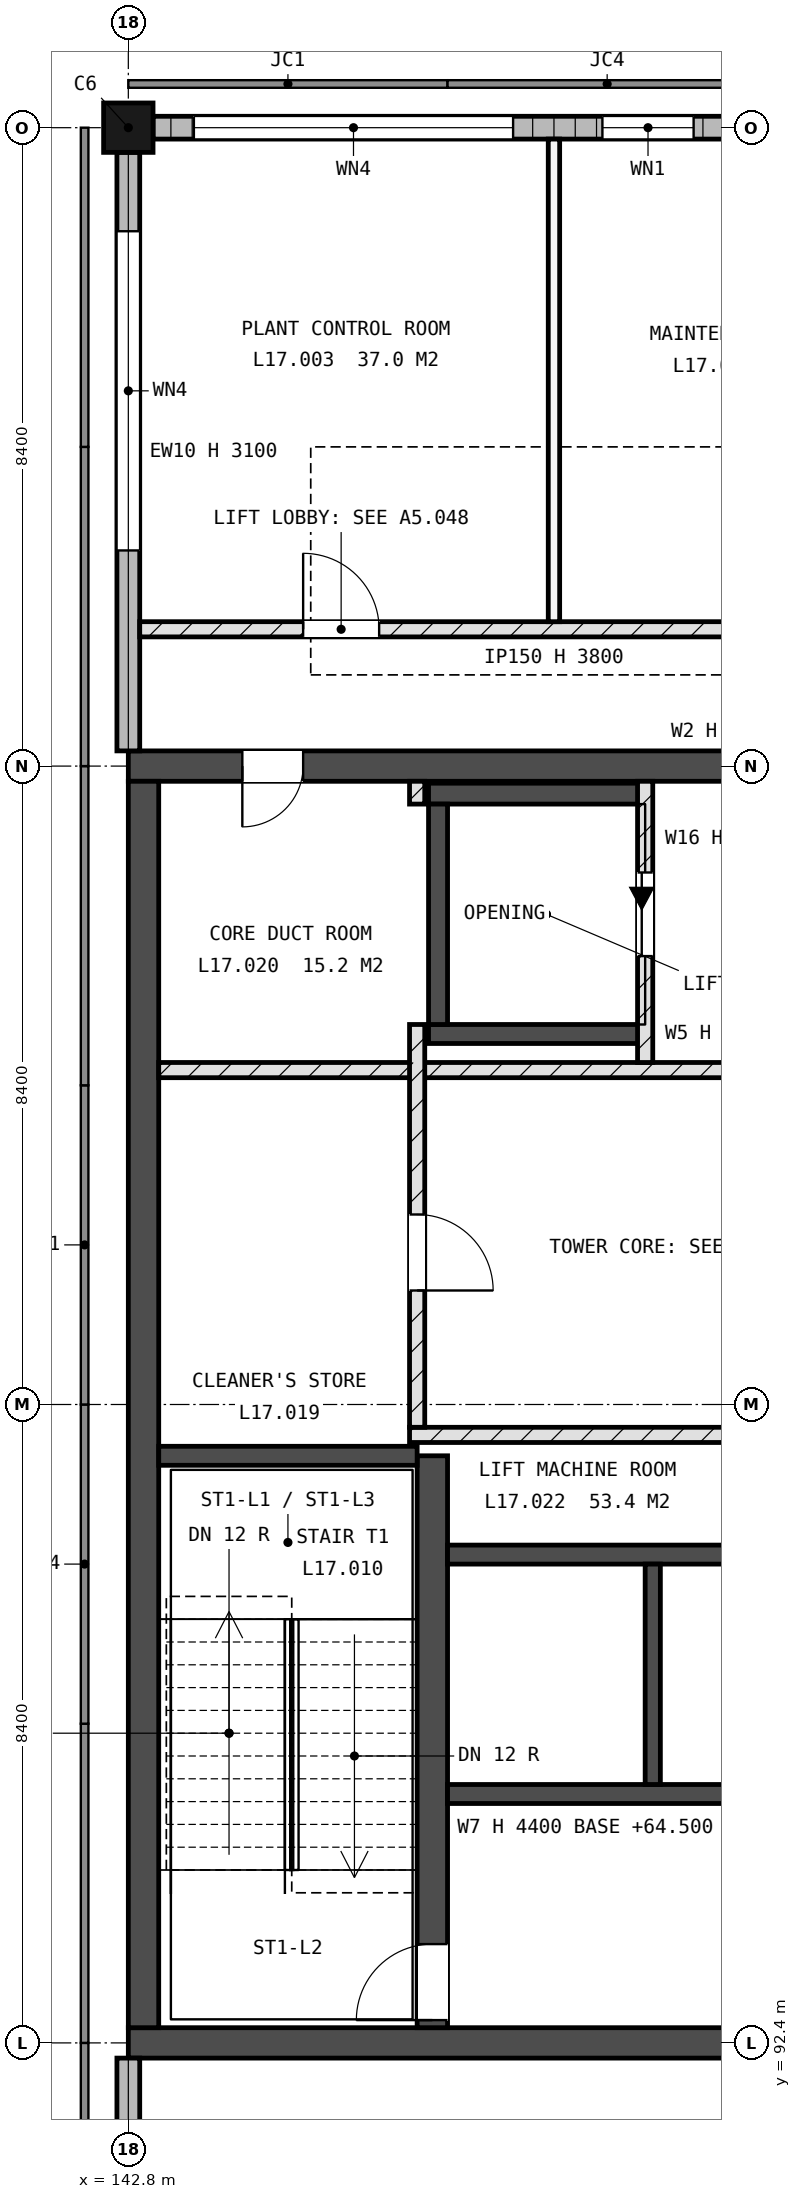
"""IFC4 building model, lengths in metres.
Left out: names, types, materials, properties, quantities, classifications, styles, units other than length and angle.
Written with IfcOpenShell. Run it as: python <this file> out.ifc"""

import sys

from ifc_helpers import new_model, si_unit, direction, frame, frame_2d, origin, origin_2d, place, context, subcontext, project, spatial, rectangle, extrude, element, fill, save


model = new_model("IFC4")
c1 = context("Model", 3, precision=1e-05, world=origin(), true_north=direction((0.0, 1.0)))
c2 = subcontext(c1, "Body", "Model", "MODEL_VIEW")
j1 = project(units=[si_unit("LENGTHUNIT", "METRE"), si_unit("PLANEANGLEUNIT", "RADIAN")], contexts=[c1])
p1 = place(None, origin())
s1 = spatial("IfcSite", under=j1, at=p1, CompositionType="ELEMENT")
p2 = place(p1, origin())
s2 = spatial("IfcBuilding", under=s1, at=p2, CompositionType="ELEMENT")
p3 = place(p2, frame((0.0, 0.0, 64.8)))
s3 = spatial("IfcBuildingStorey", under=s2, at=p3, CompositionType="ELEMENT", Elevation=64.8)
p4 = place(p3, frame((142.8, 117.6, -0.3), z_axis=(0.0, 0.0, 1.0), x_axis=(1.0, 0.0, 0.0)))
e1 = element("IfcColumn", 1, at=p4, inside=s3, PredefinedType="COLUMN", context=c2, shape_type="SweptSolid", body=[
    extrude(rectangle(XDim=0.65, YDim=0.65, at=origin_2d()), origin(), (0.0, 0.0, 1.0), 4.4),
])
p5 = place(p3, frame((142.8, 92.4, -0.3), z_axis=(0.0, 0.0, 1.0), x_axis=(1.0, 0.0, 0.0)))
e2 = element("IfcWall", 2, at=p5, inside=s3, PredefinedType="SHEAR", context=c2, shape_type="SweptSolid", body=[
    extrude(rectangle(XDim=25.2, YDim=0.4, at=frame_2d((12.6, 0.0))), origin(), (0.0, 0.0, 1.0), 4.4),
])
p6 = place(p5, frame((19.0, 0.0, 0.3)))
e3 = element("IfcOpeningElement", 3, at=p6, cuts=e2, PredefinedType="OPENING", context=c2, shape_type="SweptSolid", body=[
    extrude(rectangle(XDim=1.2, YDim=2.4, at=frame_2d((0.6, 1.2))), frame((0.0, 0.21, 0.0), z_axis=(0.0, -1.0, 0.0), x_axis=(1.0, 0.0, 0.0)), (0.0, 0.0, 1.0), 0.42),
])
p7 = place(p3, frame((142.8, 109.2, -0.3), z_axis=(0.0, 0.0, 1.0), x_axis=(1.0, 0.0, 0.0)))
e4 = element("IfcWall", 4, at=p7, inside=s3, PredefinedType="SHEAR", context=c2, shape_type="SweptSolid", body=[
    extrude(rectangle(XDim=25.2, YDim=0.4, at=frame_2d((12.6, 0.0))), origin(), (0.0, 0.0, 1.0), 4.4),
])
p8 = place(p7, frame((22.8, 0.0, 0.3)))
e5 = element("IfcOpeningElement", 5, at=p8, cuts=e4, PredefinedType="OPENING", context=c2, shape_type="SweptSolid", body=[
    extrude(rectangle(XDim=1.0, YDim=2.1, at=frame_2d((0.5, 1.05))), frame((0.0, 0.21, 0.0), z_axis=(0.0, -1.0, 0.0), x_axis=(1.0, 0.0, 0.0)), (0.0, 0.0, 1.0), 0.42),
])
p9 = place(p7, frame((1.5, 0.0, 0.3)))
e6 = element("IfcOpeningElement", 6, at=p9, cuts=e4, PredefinedType="OPENING", context=c2, shape_type="SweptSolid", body=[
    extrude(rectangle(XDim=0.8, YDim=2.1, at=frame_2d((0.4, 1.05))), frame((0.0, 0.21, 0.0), z_axis=(0.0, -1.0, 0.0), x_axis=(1.0, 0.0, 0.0)), (0.0, 0.0, 1.0), 0.42),
])
p10 = place(p7, frame((13.4, 0.0, 0.3)))
e7 = element("IfcOpeningElement", 7, at=p10, cuts=e4, PredefinedType="OPENING", context=c2, shape_type="SweptSolid", body=[
    extrude(rectangle(XDim=1.0, YDim=2.1, at=frame_2d((0.5, 1.05))), frame((0.0, 0.21, 0.0), z_axis=(0.0, -1.0, 0.0), x_axis=(1.0, 0.0, 0.0)), (0.0, 0.0, 1.0), 0.42),
])
p11 = place(p3, frame((143.0, 92.6, -0.3), z_axis=(0.0, 0.0, 1.0), x_axis=(0.0, 1.0, 0.0)))
e8 = element("IfcWall", 8, at=p11, inside=s3, PredefinedType="SHEAR", context=c2, shape_type="SweptSolid", body=[
    extrude(rectangle(XDim=16.4, YDim=0.4, at=frame_2d((8.2, 0.0))), origin(), (0.0, 0.0, 1.0), 4.4),
])
p12 = place(p3, frame((146.8, 92.6, -0.3), z_axis=(0.0, 0.0, 1.0), x_axis=(0.0, 1.0, 0.0)))
e9 = element("IfcWall", 9, at=p12, inside=s3, PredefinedType="SHEAR", context=c2, shape_type="SweptSolid", body=[
    extrude(rectangle(XDim=7.525, YDim=0.4, at=frame_2d((3.762, 0.0))), origin(), (0.0, 0.0, 1.0), 4.4),
])
p13 = place(p12, frame((0.1, 0.0, 0.3)))
e10 = element("IfcOpeningElement", 10, at=p13, cuts=e9, PredefinedType="OPENING", context=c2, shape_type="SweptSolid", body=[
    extrude(rectangle(XDim=1.0, YDim=2.1, at=frame_2d((0.5, 1.05))), frame((0.0, 0.21, 0.0), z_axis=(0.0, -1.0, 0.0), x_axis=(1.0, 0.0, 0.0)), (0.0, 0.0, 1.0), 0.42),
])
p14 = place(p3, frame((143.2, 100.125, -0.3), z_axis=(0.0, 0.0, 1.0), x_axis=(1.0, 0.0, 0.0)))
e11 = element("IfcWall", 11, at=p14, inside=s3, PredefinedType="SHEAR", context=c2, shape_type="SweptSolid", body=[
    extrude(rectangle(XDim=3.4, YDim=0.25, at=frame_2d((1.7, 0.0))), origin(), (0.0, 0.0, 1.0), 4.4),
])
for number, where, z_axis, x_axis in (
    (12, (147.0, 95.675, -0.3), (0.0, 0.0, 1.0), (1.0, 0.0, 0.0)),
    (13, (147.0, 98.825, -0.3), (0.0, 0.0, 1.0), (1.0, 0.0, 0.0)),
):
    element("IfcWall", number, at=place(p3, frame(where, z_axis=z_axis, x_axis=x_axis)), inside=s3, PredefinedType="SHEAR", context=c2, shape_type="SweptSolid", body=[
        extrude(rectangle(XDim=11.25, YDim=0.25, at=frame_2d((5.625, 0.0))), origin(), (0.0, 0.0, 1.0), 4.4),
    ])
p15 = place(p3, frame((149.7, 95.8, -0.3), z_axis=(0.0, 0.0, 1.0), x_axis=(0.0, 1.0, 0.0)))
e14 = element("IfcWall", 14, at=p15, inside=s3, PredefinedType="SHEAR", context=c2, shape_type="SweptSolid", body=[
    extrude(rectangle(XDim=2.9, YDim=0.2, at=frame_2d((1.45, 0.0))), origin(), (0.0, 0.0, 1.0), 4.4),
])
p16 = place(p3, frame((146.75, 105.675, -0.3), z_axis=(0.0, 0.0, 1.0), x_axis=(1.0, 0.0, 0.0)))
e15 = element("IfcWall", 15, at=p16, inside=s3, PredefinedType="SHEAR", context=c2, shape_type="SweptSolid", body=[
    extrude(rectangle(XDim=2.85, YDim=0.25, at=frame_2d((1.425, 0.0))), origin(), (0.0, 0.0, 1.0), 4.4),
])
p17 = place(p3, frame((146.75, 108.837, -0.3), z_axis=(0.0, 0.0, 1.0), x_axis=(1.0, 0.0, 0.0)))
e16 = element("IfcWall", 16, at=p17, inside=s3, PredefinedType="SHEAR", context=c2, shape_type="SweptSolid", body=[
    extrude(rectangle(XDim=2.85, YDim=0.275, at=frame_2d((1.425, 0.0))), origin(), (0.0, 0.0, 1.0), 4.4),
])
p18 = place(p3, frame((146.875, 105.8, -0.3), z_axis=(0.0, 0.0, 1.0), x_axis=(0.0, 1.0, 0.0)))
e17 = element("IfcWall", 17, at=p18, inside=s3, PredefinedType="SHEAR", context=c2, shape_type="SweptSolid", body=[
    extrude(rectangle(XDim=2.9, YDim=0.25, at=frame_2d((1.45, 0.0))), origin(), (0.0, 0.0, 1.0), 4.4),
])
p19 = place(p3, frame((143.125, 117.6, 0.0), z_axis=(0.0, 0.0, 1.0), x_axis=(1.0, 0.0, 0.0)))
e18 = element("IfcWall", 18, at=p19, inside=s3, PredefinedType="STANDARD", context=c2, shape_type="SweptSolid", body=[
    extrude(rectangle(XDim=7.75, YDim=0.3, at=frame_2d((3.875, 0.0))), origin(), (0.0, 0.0, 1.0), 3.1),
])
p20 = place(p19, frame((0.538, 0.0, 0.9)))
e19 = element("IfcOpeningElement", 19, at=p20, cuts=e18, PredefinedType="OPENING", context=c2, shape_type="SweptSolid", body=[
    extrude(rectangle(XDim=4.2, YDim=1.5, at=frame_2d((2.1, 0.75))), frame((0.0, 0.16, 0.0), z_axis=(0.0, -1.0, 0.0), x_axis=(1.0, 0.0, 0.0)), (0.0, 0.0, 1.0), 0.32),
])
p21 = place(p19, frame((5.913, 0.0, 0.9)))
e20 = element("IfcOpeningElement", 20, at=p21, cuts=e18, PredefinedType="OPENING", context=c2, shape_type="SweptSolid", body=[
    extrude(rectangle(XDim=1.2, YDim=1.5, at=frame_2d((0.6, 0.75))), frame((0.0, 0.16, 0.0), z_axis=(0.0, -1.0, 0.0), x_axis=(1.0, 0.0, 0.0)), (0.0, 0.0, 1.0), 0.32),
])
p22 = place(p3, frame((142.8, 84.325, 0.0), z_axis=(0.0, 0.0, 1.0), x_axis=(0.0, 1.0, 0.0)))
e21 = element("IfcWall", 21, at=p22, inside=s3, PredefinedType="STANDARD", context=c2, shape_type="SweptSolid", body=[
    extrude(rectangle(XDim=7.875, YDim=0.3, at=frame_2d((3.938, 0.0))), origin(), (0.0, 0.0, 1.0), 3.8),
])
p23 = place(p22, frame((2.438, 0.0, 0.55)))
e22 = element("IfcOpeningElement", 22, at=p23, cuts=e21, PredefinedType="OPENING", context=c2, shape_type="SweptSolid", body=[
    extrude(rectangle(XDim=3.0, YDim=2.4, at=frame_2d((1.5, 1.2))), frame((0.0, 0.16, 0.0), z_axis=(0.0, -1.0, 0.0), x_axis=(1.0, 0.0, 0.0)), (0.0, 0.0, 1.0), 0.32),
])
p24 = place(p3, frame((142.8, 109.4, 0.0), z_axis=(0.0, 0.0, 1.0), x_axis=(0.0, 1.0, 0.0)))
e23 = element("IfcWall", 23, at=p24, inside=s3, PredefinedType="STANDARD", context=c2, shape_type="SweptSolid", body=[
    extrude(rectangle(XDim=7.875, YDim=0.3, at=frame_2d((3.938, 0.0))), origin(), (0.0, 0.0, 1.0), 3.1),
])
p25 = place(p24, frame((2.637, 0.0, 0.9)))
e24 = element("IfcOpeningElement", 24, at=p25, cuts=e23, PredefinedType="OPENING", context=c2, shape_type="SweptSolid", body=[
    extrude(rectangle(XDim=4.2, YDim=1.5, at=frame_2d((2.1, 0.75))), frame((0.0, 0.16, 0.0), z_axis=(0.0, -1.0, 0.0), x_axis=(1.0, 0.0, 0.0)), (0.0, 0.0, 1.0), 0.32),
])
p26 = place(p3, frame((146.5, 100.4, 0.0), z_axis=(0.0, 0.0, 1.0), x_axis=(1.0, 0.0, 0.0)))
e25 = element("IfcWall", 25, at=p26, inside=s3, PredefinedType="SOLIDWALL", context=c2, shape_type="SweptSolid", body=[
    extrude(rectangle(XDim=11.8, YDim=0.2, at=frame_2d((5.9, 0.0))), origin(), (0.0, 0.0, 1.0), 3.8),
])
p27 = place(p26, frame((5.5, 0.0, 0.0)))
e26 = element("IfcOpeningElement", 26, at=p27, cuts=e25, PredefinedType="OPENING", context=c2, shape_type="SweptSolid", body=[
    extrude(rectangle(XDim=0.8, YDim=2.1, at=frame_2d((0.4, 1.05))), frame((0.0, 0.11, 0.0), z_axis=(0.0, -1.0, 0.0), x_axis=(1.0, 0.0, 0.0)), (0.0, 0.0, 1.0), 0.22),
])
p28 = place(p3, frame((143.2, 105.2, 0.0), z_axis=(0.0, 0.0, 1.0), x_axis=(1.0, 0.0, 0.0)))
e27 = element("IfcWall", 27, at=p28, inside=s3, PredefinedType="SOLIDWALL", context=c2, shape_type="SweptSolid", body=[
    extrude(rectangle(XDim=20.75, YDim=0.2, at=frame_2d((10.375, 0.0))), origin(), (0.0, 0.0, 1.0), 3.8),
])
p29 = place(p28, frame((18.7, 0.0, 0.0)))
e28 = element("IfcOpeningElement", 28, at=p29, cuts=e27, PredefinedType="OPENING", context=c2, shape_type="SweptSolid", body=[
    extrude(rectangle(XDim=1.0, YDim=2.1, at=frame_2d((0.5, 1.05))), frame((0.0, 0.11, 0.0), z_axis=(0.0, -1.0, 0.0), x_axis=(1.0, 0.0, 0.0)), (0.0, 0.0, 1.0), 0.22),
])
p30 = place(p3, frame((142.95, 111.0, 0.0), z_axis=(0.0, 0.0, 1.0), x_axis=(1.0, 0.0, 0.0)))
e29 = element("IfcWall", 29, at=p30, inside=s3, PredefinedType="SOLIDWALL", context=c2, shape_type="SweptSolid", body=[
    extrude(rectangle(XDim=17.85, YDim=0.2, at=frame_2d((8.925, 0.0))), origin(), (0.0, 0.0, 1.0), 3.8),
])
p31 = place(p30, frame((2.15, 0.0, 0.0)))
e30 = element("IfcOpeningElement", 30, at=p31, cuts=e29, PredefinedType="OPENING", context=c2, shape_type="SweptSolid", body=[
    extrude(rectangle(XDim=1.0, YDim=2.1, at=frame_2d((0.5, 1.05))), frame((0.0, 0.11, 0.0), z_axis=(0.0, -1.0, 0.0), x_axis=(1.0, 0.0, 0.0)), (0.0, 0.0, 1.0), 0.22),
])
p32 = place(p30, frame((7.75, 0.0, 0.0)))
e31 = element("IfcOpeningElement", 31, at=p32, cuts=e29, PredefinedType="OPENING", context=c2, shape_type="SweptSolid", body=[
    extrude(rectangle(XDim=1.0, YDim=2.1, at=frame_2d((0.5, 1.05))), frame((0.0, 0.11, 0.0), z_axis=(0.0, -1.0, 0.0), x_axis=(1.0, 0.0, 0.0)), (0.0, 0.0, 1.0), 0.22),
])
p33 = place(p30, frame((13.85, 0.0, 0.0)))
e32 = element("IfcOpeningElement", 32, at=p33, cuts=e29, PredefinedType="OPENING", context=c2, shape_type="SweptSolid", body=[
    extrude(rectangle(XDim=1.2, YDim=2.4, at=frame_2d((0.6, 1.2))), frame((0.0, 0.11, 0.0), z_axis=(0.0, -1.0, 0.0), x_axis=(1.0, 0.0, 0.0)), (0.0, 0.0, 1.0), 0.22),
])
p34 = place(p3, frame((146.6, 100.5, 0.0), z_axis=(0.0, 0.0, 1.0), x_axis=(0.0, 1.0, 0.0)))
e33 = element("IfcWall", 33, at=p34, inside=s3, PredefinedType="SOLIDWALL", context=c2, shape_type="SweptSolid", body=[
    extrude(rectangle(XDim=5.3, YDim=0.2, at=frame_2d((2.65, 0.0))), origin(), (0.0, 0.0, 1.0), 3.8),
])
p35 = place(p34, frame((1.8, 0.0, 0.0)))
e34 = element("IfcOpeningElement", 34, at=p35, cuts=e33, PredefinedType="OPENING", context=c2, shape_type="SweptSolid", body=[
    extrude(rectangle(XDim=1.0, YDim=2.1, at=frame_2d((0.5, 1.05))), frame((0.0, 0.11, 0.0), z_axis=(0.0, -1.0, 0.0), x_axis=(1.0, 0.0, 0.0)), (0.0, 0.0, 1.0), 0.22),
])
p36 = place(p3, frame((146.6, 108.7, 0.0), z_axis=(0.0, 0.0, 1.0), x_axis=(0.0, 1.0, 0.0)))
e35 = element("IfcWall", 35, at=p36, inside=s3, PredefinedType="SOLIDWALL", context=c2, shape_type="SweptSolid", body=[
    extrude(rectangle(XDim=0.3, YDim=0.2, at=frame_2d((0.15, 0.0))), origin(), (0.0, 0.0, 1.0), 3.8),
])
p37 = place(p3, frame((148.4, 111.1, 0.0), z_axis=(0.0, 0.0, 1.0), x_axis=(0.0, 1.0, 0.0)))
e36 = element("IfcWall", 36, at=p37, inside=s3, PredefinedType="PARTITIONING", context=c2, shape_type="SweptSolid", body=[
    extrude(rectangle(XDim=6.35, YDim=0.15, at=frame_2d((3.175, 0.0))), origin(), (0.0, 0.0, 1.0), 3.8),
])
p38 = place(p3, frame((149.6, 105.3, 0.0), z_axis=(0.0, 0.0, 1.0), x_axis=(0.0, 1.0, 0.0)))
e37 = element("IfcWall", 37, at=p38, inside=s3, PredefinedType="SOLIDWALL", context=c2, shape_type="SweptSolid", body=[
    extrude(rectangle(XDim=3.7, YDim=0.2, at=frame_2d((1.85, 0.0))), origin(), (0.0, 0.0, 1.0), 3.8),
])
p39 = place(p38, frame((1.4, 0.0, 0.0)))
e38 = element("IfcOpeningElement", 38, at=p39, cuts=e37, PredefinedType="OPENING", context=c2, shape_type="SweptSolid", body=[
    extrude(rectangle(XDim=1.1, YDim=2.1, at=frame_2d((0.55, 1.05))), frame((0.0, 0.11, 0.0), z_axis=(0.0, -1.0, 0.0), x_axis=(1.0, 0.0, 0.0)), (0.0, 0.0, 1.0), 0.22),
])
p40 = place(p20, origin())
e39 = element("IfcWindow", 39, at=p40, inside=s3, PartitioningType="SINGLE_PANEL", PredefinedType="WINDOW", context=c2, shape_type="SweptSolid", body=[
    extrude(rectangle(XDim=4.2, YDim=1.5, at=frame_2d((2.1, 0.75))), frame((0.0, 0.03, 0.0), z_axis=(0.0, -1.0, 0.0), x_axis=(1.0, 0.0, 0.0)), (0.0, 0.0, 1.0), 0.06),
])
fill(e19, e39)
p41 = place(p21, origin())
e40 = element("IfcWindow", 40, at=p41, inside=s3, PartitioningType="SINGLE_PANEL", PredefinedType="WINDOW", context=c2, shape_type="SweptSolid", body=[
    extrude(rectangle(XDim=1.2, YDim=1.5, at=frame_2d((0.6, 0.75))), frame((0.0, 0.03, 0.0), z_axis=(0.0, -1.0, 0.0), x_axis=(1.0, 0.0, 0.0)), (0.0, 0.0, 1.0), 0.06),
])
fill(e20, e40)
p42 = place(p25, origin())
e41 = element("IfcWindow", 41, at=p42, inside=s3, PartitioningType="SINGLE_PANEL", PredefinedType="WINDOW", context=c2, shape_type="SweptSolid", body=[
    extrude(rectangle(XDim=4.2, YDim=1.5, at=frame_2d((2.1, 0.75))), frame((0.0, 0.03, 0.0), z_axis=(0.0, -1.0, 0.0), x_axis=(1.0, 0.0, 0.0)), (0.0, 0.0, 1.0), 0.06),
])
fill(e24, e41)
p43 = place(p39, origin())
e42 = element("IfcDoor", 42, at=p43, inside=s3, OperationType="SLIDING_TO_LEFT", PredefinedType="DOOR", context=c2, shape_type="SweptSolid", body=[
    extrude(rectangle(XDim=1.1, YDim=2.1, at=frame_2d((0.55, 1.05))), frame((0.0, 0.025, 0.0), z_axis=(0.0, -1.0, 0.0), x_axis=(1.0, 0.0, 0.0)), (0.0, 0.0, 1.0), 0.05),
])
fill(e38, e42)
p44 = place(p13, origin())
e43 = element("IfcDoor", 43, at=p44, inside=s3, OperationType="SINGLE_SWING_RIGHT", PredefinedType="DOOR", context=c2, shape_type="SweptSolid", body=[
    extrude(rectangle(XDim=1.0, YDim=2.1, at=frame_2d((0.5, 1.05))), frame((0.0, 0.025, 0.0), z_axis=(0.0, -1.0, 0.0), x_axis=(1.0, 0.0, 0.0)), (0.0, 0.0, 1.0), 0.05),
])
fill(e10, e43)
p45 = place(p31, origin())
e44 = element("IfcDoor", 44, at=p45, inside=s3, OperationType="SINGLE_SWING_RIGHT", PredefinedType="DOOR", context=c2, shape_type="SweptSolid", body=[
    extrude(rectangle(XDim=1.0, YDim=2.1, at=frame_2d((0.5, 1.05))), frame((0.0, 0.025, 0.0), z_axis=(0.0, -1.0, 0.0), x_axis=(1.0, 0.0, 0.0)), (0.0, 0.0, 1.0), 0.05),
])
fill(e30, e44)
p46 = place(p35, origin())
e45 = element("IfcDoor", 45, at=p46, inside=s3, OperationType="SINGLE_SWING_LEFT", PredefinedType="DOOR", context=c2, shape_type="SweptSolid", body=[
    extrude(rectangle(XDim=1.0, YDim=2.1, at=frame_2d((0.5, 1.05))), frame((0.0, 0.025, 0.0), z_axis=(0.0, -1.0, 0.0), x_axis=(1.0, 0.0, 0.0)), (0.0, 0.0, 1.0), 0.05),
])
fill(e34, e45)
p47 = place(p9, origin())
e46 = element("IfcDoor", 46, at=p47, inside=s3, OperationType="SINGLE_SWING_LEFT", PredefinedType="DOOR", context=c2, shape_type="SweptSolid", body=[
    extrude(rectangle(XDim=0.8, YDim=2.1, at=frame_2d((0.4, 1.05))), frame((0.0, 0.025, 0.0), z_axis=(0.0, -1.0, 0.0), x_axis=(1.0, 0.0, 0.0)), (0.0, 0.0, 1.0), 0.05),
])
fill(e6, e46)
save(model, sys.argv[1])
